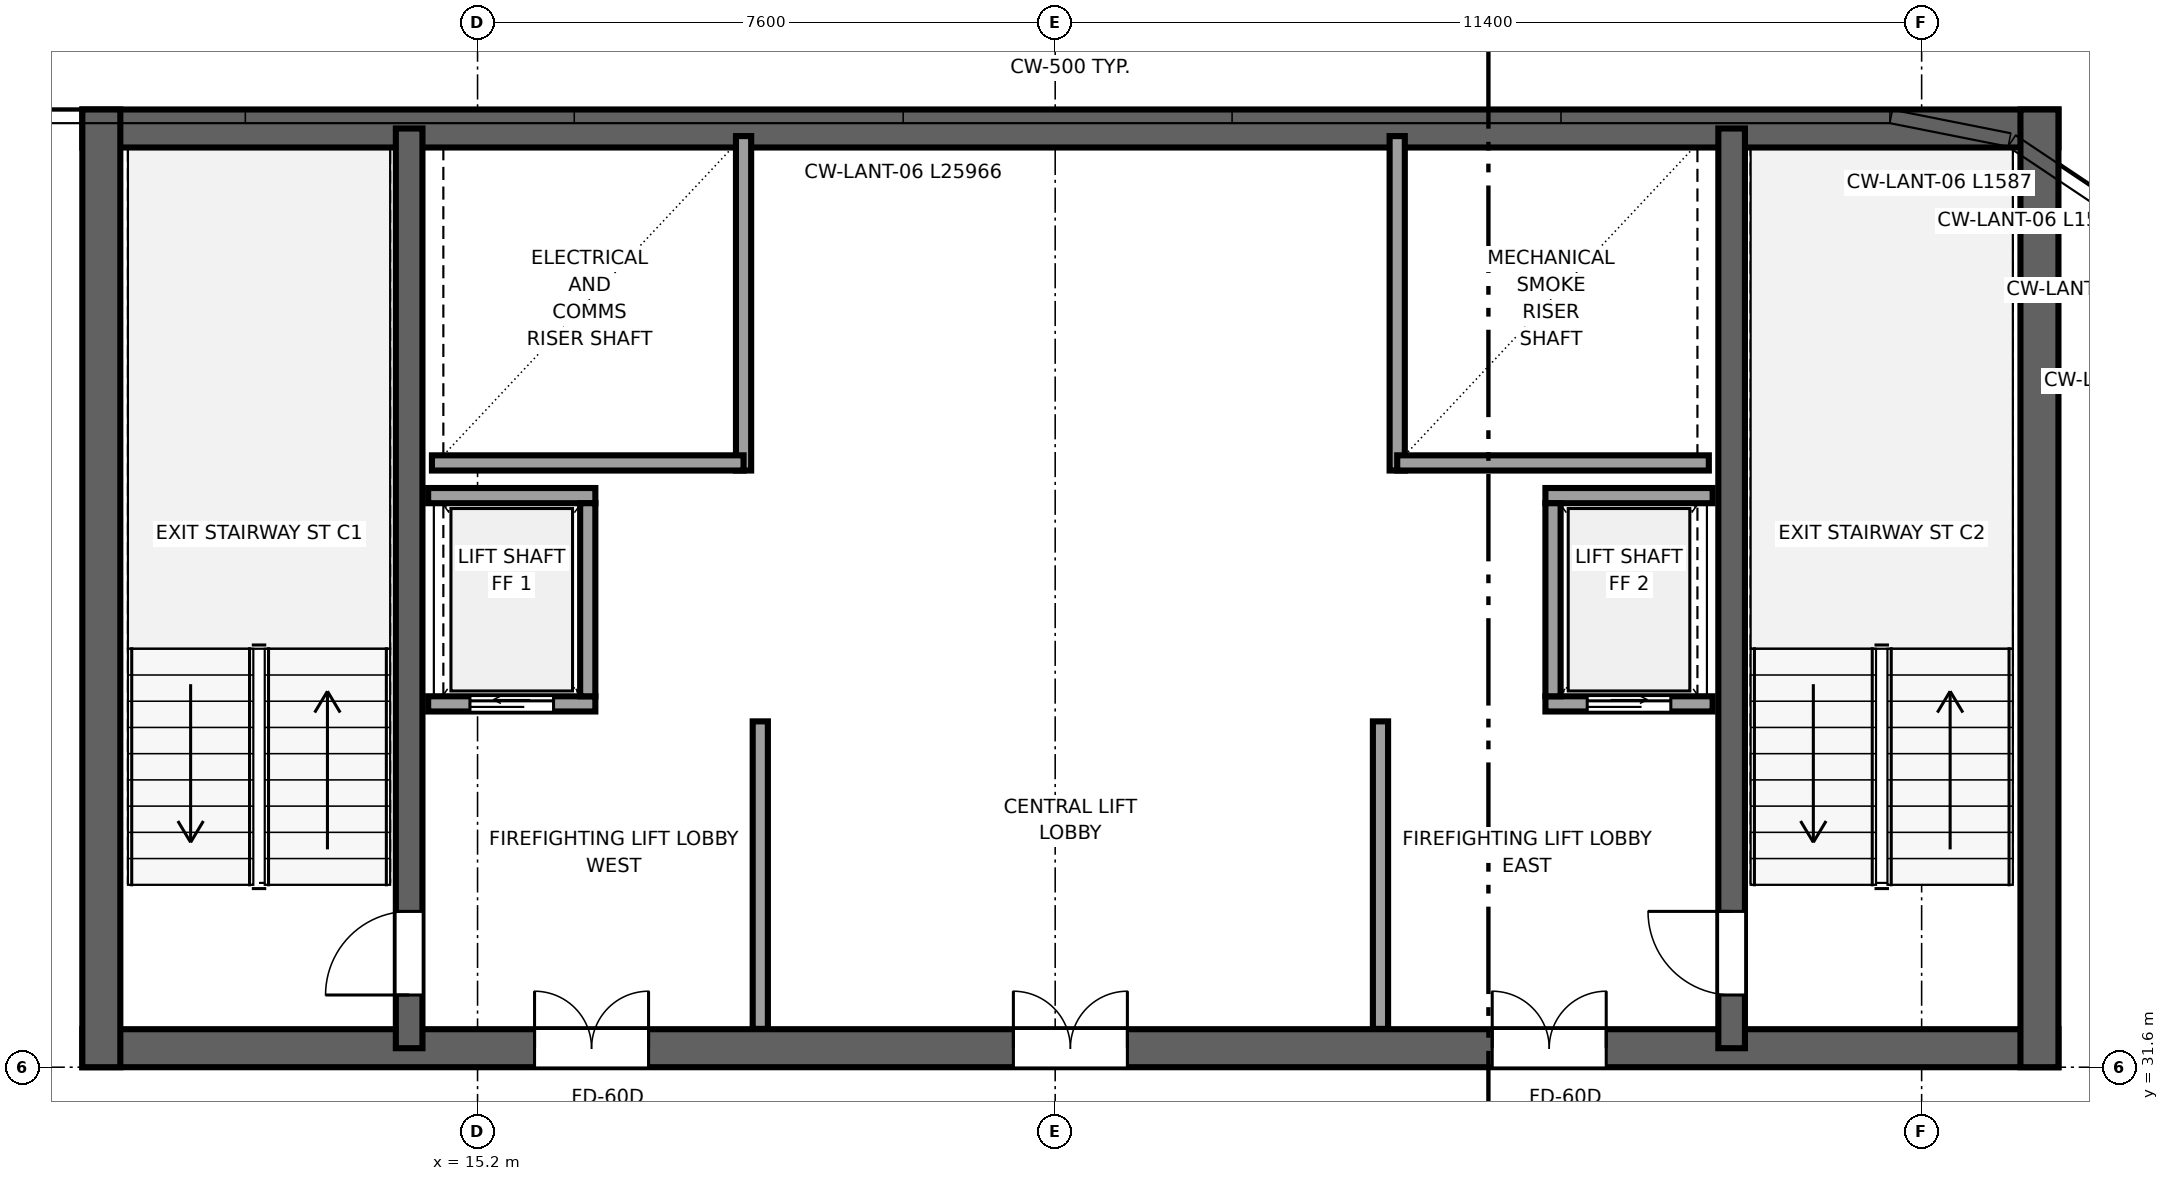
"""IFC4 building model, lengths in metres.
Left out: names, types, materials, properties, quantities, classifications, styles, units other than length and angle.
Written with IfcOpenShell. Run it as: python <this file> out.ifc"""

import sys

from ifc_helpers import new_model, si_unit, direction, frame, frame_2d, origin, place, context, subcontext, project, spatial, rectangle, extrude, source, transform, mapped, element, fill, save


model = new_model("IFC4")
c1 = context("Model", 3, precision=1e-05, world=origin(), true_north=direction((0.0, 1.0)))
c2 = subcontext(c1, "Body", "Model", "MODEL_VIEW")
j1 = project(units=[si_unit("LENGTHUNIT", "METRE"), si_unit("PLANEANGLEUNIT", "RADIAN")], contexts=[c1])
p1 = place(None, origin())
s1 = spatial("IfcSite", under=j1, at=p1, CompositionType="ELEMENT")
p2 = place(p1, origin())
s2 = spatial("IfcBuilding", under=s1, at=p2, CompositionType="ELEMENT")
p3 = place(p2, frame((0.0, 0.0, 294.75)))
s3 = spatial("IfcBuildingStorey", under=s2, at=p3, CompositionType="ELEMENT", Elevation=294.75)
p4 = place(p3, frame((10.0, 31.85, 0.0), z_axis=(0.0, 0.0, 1.0), x_axis=(1.0, 0.0, 0.0)))
e1 = element("IfcWall", 1, at=p4, inside=s3, PredefinedType="SHEAR", context=c2, shape_type="SweptSolid", body=[
    extrude(rectangle(XDim=26.0, YDim=0.5, at=frame_2d((13.0, 0.0))), origin(), (0.0, 0.0, 1.0), 3.8),
])
p5 = place(p4, frame((7.45, 0.0, 0.0), z_axis=(0.0, 0.0, 1.0), x_axis=(-1.0, 0.0, 0.0)))
e2 = element("IfcOpeningElement", 2, at=p5, cuts=e1, PredefinedType="OPENING", context=c2, shape_type="SweptSolid", body=[
    extrude(rectangle(XDim=1.5, YDim=2.04, at=frame_2d((0.75, 1.02))), frame((0.0, 0.26, 0.0), z_axis=(0.0, -1.0, 0.0), x_axis=(1.0, 0.0, 0.0)), (0.0, 0.0, 1.0), 0.52),
])
p6 = place(p4, frame((13.75, 0.0, 0.0), z_axis=(0.0, 0.0, 1.0), x_axis=(-1.0, 0.0, 0.0)))
e3 = element("IfcOpeningElement", 3, at=p6, cuts=e1, PredefinedType="OPENING", context=c2, shape_type="SweptSolid", body=[
    extrude(rectangle(XDim=1.5, YDim=2.04, at=frame_2d((0.75, 1.02))), frame((0.0, 0.26, 0.0), z_axis=(0.0, -1.0, 0.0), x_axis=(1.0, 0.0, 0.0)), (0.0, 0.0, 1.0), 0.52),
])
p7 = place(p4, frame((20.05, 0.0, 0.0), z_axis=(0.0, 0.0, 1.0), x_axis=(-1.0, 0.0, 0.0)))
e4 = element("IfcOpeningElement", 4, at=p7, cuts=e1, PredefinedType="OPENING", context=c2, shape_type="SweptSolid", body=[
    extrude(rectangle(XDim=1.5, YDim=2.04, at=frame_2d((0.75, 1.02))), frame((0.0, 0.26, 0.0), z_axis=(0.0, -1.0, 0.0), x_axis=(1.0, 0.0, 0.0)), (0.0, 0.0, 1.0), 0.52),
])
p8 = place(p3, frame((10.0, 43.95, 0.0), z_axis=(0.0, 0.0, 1.0), x_axis=(1.0, 0.0, 0.0)))
e5 = element("IfcWall", 5, at=p8, inside=s3, PredefinedType="SHEAR", context=c2, shape_type="SweptSolid", body=[
    extrude(rectangle(XDim=26.0, YDim=0.5, at=frame_2d((13.0, 0.0))), origin(), (0.0, 0.0, 1.0), 3.8),
])
for number, where, z_axis, x_axis in (
    (6, (10.25, 31.6, 0.0), (0.0, 0.0, 1.0), (0.0, 1.0, 0.0)),
    (7, (35.75, 31.6, 0.0), (0.0, 0.0, 1.0), (0.0, 1.0, 0.0)),
):
    element("IfcWall", number, at=place(p3, frame(where, z_axis=z_axis, x_axis=x_axis)), inside=s3, PredefinedType="SHEAR", context=c2, shape_type="SweptSolid", body=[
        extrude(rectangle(XDim=12.6, YDim=0.5, at=frame_2d((6.3, 0.0))), origin(), (0.0, 0.0, 1.0), 3.8),
    ])
p9 = place(p3, frame((14.3, 31.85, 0.0), z_axis=(0.0, 0.0, 1.0), x_axis=(0.0, 1.0, 0.0)))
e8 = element("IfcWall", 8, at=p9, inside=s3, PredefinedType="SHEAR", context=c2, shape_type="SweptSolid", body=[
    extrude(rectangle(XDim=12.1, YDim=0.35, at=frame_2d((6.05, 0.0))), origin(), (0.0, 0.0, 1.0), 3.8),
])
p10 = place(p9, frame((0.7, 0.0, 0.0)))
e9 = element("IfcOpeningElement", 9, at=p10, cuts=e8, PredefinedType="OPENING", context=c2, shape_type="SweptSolid", body=[
    extrude(rectangle(XDim=1.1, YDim=2.12, at=frame_2d((0.55, 1.06))), frame((0.0, 0.185, 0.0), z_axis=(0.0, -1.0, 0.0), x_axis=(1.0, 0.0, 0.0)), (0.0, 0.0, 1.0), 0.37),
])
p11 = place(p3, frame((31.7, 31.85, 0.0), z_axis=(0.0, 0.0, 1.0), x_axis=(0.0, 1.0, 0.0)))
e10 = element("IfcWall", 10, at=p11, inside=s3, PredefinedType="SHEAR", context=c2, shape_type="SweptSolid", body=[
    extrude(rectangle(XDim=12.1, YDim=0.35, at=frame_2d((6.05, 0.0))), origin(), (0.0, 0.0, 1.0), 3.8),
])
p12 = place(p11, frame((1.8, 0.0, 0.0), z_axis=(0.0, 0.0, 1.0), x_axis=(-1.0, 0.0, 0.0)))
e11 = element("IfcOpeningElement", 11, at=p12, cuts=e10, PredefinedType="OPENING", context=c2, shape_type="SweptSolid", body=[
    extrude(rectangle(XDim=1.1, YDim=2.12, at=frame_2d((0.55, 1.06))), frame((0.0, 0.185, 0.0), z_axis=(0.0, -1.0, 0.0), x_axis=(1.0, 0.0, 0.0)), (0.0, 0.0, 1.0), 0.37),
])
p13 = place(p3, frame((18.7, 39.45, 0.0), z_axis=(0.0, 0.0, 1.0), x_axis=(0.0, 1.0, 0.0)))
e12 = element("IfcWall", 12, at=p13, inside=s3, PredefinedType="SOLIDWALL", context=c2, shape_type="SweptSolid", body=[
    extrude(rectangle(XDim=4.4, YDim=0.2, at=frame_2d((2.2, 0.0))), origin(), (0.0, 0.0, 1.0), 3.58),
])
p14 = place(p3, frame((14.6, 39.55, 0.0), z_axis=(0.0, 0.0, 1.0), x_axis=(1.0, 0.0, 0.0)))
e13 = element("IfcWall", 13, at=p14, inside=s3, PredefinedType="SOLIDWALL", context=c2, shape_type="SweptSolid", body=[
    extrude(rectangle(XDim=4.1, YDim=0.2, at=frame_2d((2.05, 0.0))), origin(), (0.0, 0.0, 1.0), 3.58),
])
p15 = place(p3, frame((27.3, 39.45, 0.0), z_axis=(0.0, 0.0, 1.0), x_axis=(0.0, 1.0, 0.0)))
e14 = element("IfcWall", 14, at=p15, inside=s3, PredefinedType="SOLIDWALL", context=c2, shape_type="SweptSolid", body=[
    extrude(rectangle(XDim=4.4, YDim=0.2, at=frame_2d((2.2, 0.0))), origin(), (0.0, 0.0, 1.0), 3.58),
])
p16 = place(p3, frame((27.3, 39.55, 0.0), z_axis=(0.0, 0.0, 1.0), x_axis=(1.0, 0.0, 0.0)))
e15 = element("IfcWall", 15, at=p16, inside=s3, PredefinedType="SOLIDWALL", context=c2, shape_type="SweptSolid", body=[
    extrude(rectangle(XDim=4.1, YDim=0.2, at=frame_2d((2.05, 0.0))), origin(), (0.0, 0.0, 1.0), 3.58),
])
for number, where, z_axis, x_axis in (
    (16, (18.92, 32.104, 0.0), (0.0, 0.0, 1.0), (0.0, 1.0, 0.0)),
    (17, (27.08, 32.104, 0.0), (0.0, 0.0, 1.0), (0.0, 1.0, 0.0)),
):
    element("IfcWall", number, at=place(p3, frame(where, z_axis=z_axis, x_axis=x_axis)), inside=s3, PredefinedType="SOLIDWALL", context=c2, shape_type="SweptSolid", body=[
        extrude(rectangle(XDim=4.046, YDim=0.2, at=frame_2d((2.023, 0.0))), origin(), (0.0, 0.0, 1.0), 3.58),
    ])
p17 = place(p3, frame((29.25, 36.38, 0.0), z_axis=(0.0, 0.0, 1.0), x_axis=(1.0, 0.0, 0.0)))
e18 = element("IfcWall", 18, at=p17, inside=s3, PredefinedType="SOLIDWALL", context=c2, shape_type="SweptSolid", body=[
    extrude(rectangle(XDim=2.2, YDim=0.2, at=frame_2d((1.1, 0.0))), origin(), (0.0, 0.0, 1.0), 3.58),
])
p18 = place(p17, frame((0.55, 0.0, 0.0)))
e19 = element("IfcOpeningElement", 19, at=p18, cuts=e18, PredefinedType="OPENING", context=c2, shape_type="SweptSolid", body=[
    extrude(rectangle(XDim=1.1, YDim=2.12, at=frame_2d((0.55, 1.06))), frame((0.0, 0.11, 0.0), z_axis=(0.0, -1.0, 0.0), x_axis=(1.0, 0.0, 0.0)), (0.0, 0.0, 1.0), 0.22),
])
p19 = place(p3, frame((29.25, 39.12, 0.0), z_axis=(0.0, 0.0, 1.0), x_axis=(1.0, 0.0, 0.0)))
e20 = element("IfcWall", 20, at=p19, inside=s3, PredefinedType="SOLIDWALL", context=c2, shape_type="SweptSolid", body=[
    extrude(rectangle(XDim=2.2, YDim=0.2, at=frame_2d((1.1, 0.0))), origin(), (0.0, 0.0, 1.0), 3.58),
])
p20 = place(p3, frame((29.35, 36.48, 0.0), z_axis=(0.0, 0.0, 1.0), x_axis=(0.0, 1.0, 0.0)))
e21 = element("IfcWall", 21, at=p20, inside=s3, PredefinedType="SOLIDWALL", context=c2, shape_type="SweptSolid", body=[
    extrude(rectangle(XDim=2.54, YDim=0.2, at=frame_2d((1.27, 0.0))), origin(), (0.0, 0.0, 1.0), 3.58),
])
p21 = place(p3, frame((14.55, 36.38, 0.0), z_axis=(0.0, 0.0, 1.0), x_axis=(1.0, 0.0, 0.0)))
e22 = element("IfcWall", 22, at=p21, inside=s3, PredefinedType="SOLIDWALL", context=c2, shape_type="SweptSolid", body=[
    extrude(rectangle(XDim=2.2, YDim=0.2, at=frame_2d((1.1, 0.0))), origin(), (0.0, 0.0, 1.0), 3.58),
])
p22 = place(p21, frame((0.55, 0.0, 0.0)))
e23 = element("IfcOpeningElement", 23, at=p22, cuts=e22, PredefinedType="OPENING", context=c2, shape_type="SweptSolid", body=[
    extrude(rectangle(XDim=1.1, YDim=2.12, at=frame_2d((0.55, 1.06))), frame((0.0, 0.11, 0.0), z_axis=(0.0, -1.0, 0.0), x_axis=(1.0, 0.0, 0.0)), (0.0, 0.0, 1.0), 0.22),
])
p23 = place(p3, frame((14.55, 39.12, 0.0), z_axis=(0.0, 0.0, 1.0), x_axis=(1.0, 0.0, 0.0)))
e24 = element("IfcWall", 24, at=p23, inside=s3, PredefinedType="SOLIDWALL", context=c2, shape_type="SweptSolid", body=[
    extrude(rectangle(XDim=2.2, YDim=0.2, at=frame_2d((1.1, 0.0))), origin(), (0.0, 0.0, 1.0), 3.58),
])
p24 = place(p3, frame((16.65, 36.48, 0.0), z_axis=(0.0, 0.0, 1.0), x_axis=(0.0, 1.0, 0.0)))
e25 = element("IfcWall", 25, at=p24, inside=s3, PredefinedType="SOLIDWALL", context=c2, shape_type="SweptSolid", body=[
    extrude(rectangle(XDim=2.54, YDim=0.2, at=frame_2d((1.27, 0.0))), origin(), (0.0, 0.0, 1.0), 3.58),
])
m1 = source(origin(), c2, "Body", "SweptSolid", [
    extrude(rectangle(XDim=1.1, YDim=2.12, at=frame_2d((0.55, 1.06))), frame((0.0, 0.025, 0.0), z_axis=(0.0, -1.0, 0.0), x_axis=(1.0, 0.0, 0.0)), (0.0, 0.0, 1.0), 0.05),
])
p25 = place(p10, origin())
e26 = element("IfcDoor", 26, at=p25, inside=s3, OperationType="SINGLE_SWING_LEFT", PredefinedType="DOOR", context=c2, shape_type="MappedRepresentation", body=[
    mapped(m1, transform((0.0, 0.0, 0.0), x_axis=(1.0, 0.0, 0.0), y_axis=(0.0, 1.0, 0.0), z_axis=(0.0, 0.0, 1.0), scale=1.0)),
])
fill(e9, e26)
p26 = place(p12, origin())
e27 = element("IfcDoor", 27, at=p26, inside=s3, OperationType="SINGLE_SWING_RIGHT", PredefinedType="DOOR", context=c2, shape_type="MappedRepresentation", body=[
    mapped(m1, transform((0.0, 0.0, 0.0), x_axis=(1.0, 0.0, 0.0), y_axis=(0.0, 1.0, 0.0), z_axis=(0.0, 0.0, 1.0), scale=1.0)),
])
fill(e11, e27)
m2 = source(origin(), c2, "Body", "SweptSolid", [
    extrude(rectangle(XDim=1.5, YDim=2.04, at=frame_2d((0.75, 1.02))), frame((0.0, 0.025, 0.0), z_axis=(0.0, -1.0, 0.0), x_axis=(1.0, 0.0, 0.0)), (0.0, 0.0, 1.0), 0.05),
])
p27 = place(p5, origin())
e28 = element("IfcDoor", 28, at=p27, inside=s3, OperationType="DOUBLE_DOOR_SINGLE_SWING", PredefinedType="DOOR", context=c2, shape_type="MappedRepresentation", body=[
    mapped(m2, transform((0.0, 0.0, 0.0), x_axis=(1.0, 0.0, 0.0), y_axis=(0.0, 1.0, 0.0), z_axis=(0.0, 0.0, 1.0), scale=1.0)),
])
fill(e2, e28)
p28 = place(p6, origin())
e29 = element("IfcDoor", 29, at=p28, inside=s3, OperationType="DOUBLE_DOOR_SINGLE_SWING", PredefinedType="DOOR", context=c2, shape_type="MappedRepresentation", body=[
    mapped(m2, transform((0.0, 0.0, 0.0), x_axis=(1.0, 0.0, 0.0), y_axis=(0.0, 1.0, 0.0), z_axis=(0.0, 0.0, 1.0), scale=1.0)),
])
fill(e3, e29)
p29 = place(p7, origin())
e30 = element("IfcDoor", 30, at=p29, inside=s3, OperationType="DOUBLE_DOOR_SINGLE_SWING", PredefinedType="DOOR", context=c2, shape_type="MappedRepresentation", body=[
    mapped(m2, transform((0.0, 0.0, 0.0), x_axis=(1.0, 0.0, 0.0), y_axis=(0.0, 1.0, 0.0), z_axis=(0.0, 0.0, 1.0), scale=1.0)),
])
fill(e4, e30)
m3 = source(origin(), c2, "Body", "SweptSolid", [
    extrude(rectangle(XDim=1.1, YDim=2.12, at=frame_2d((0.55, 1.06))), frame((0.0, 0.025, 0.0), z_axis=(0.0, -1.0, 0.0), x_axis=(1.0, 0.0, 0.0)), (0.0, 0.0, 1.0), 0.05),
])
p30 = place(p18, origin())
e31 = element("IfcDoor", 31, at=p30, inside=s3, OperationType="SLIDING_TO_RIGHT", PredefinedType="DOOR", context=c2, shape_type="MappedRepresentation", body=[
    mapped(m3, transform((0.0, 0.0, 0.0), x_axis=(1.0, 0.0, 0.0), y_axis=(0.0, 1.0, 0.0), z_axis=(0.0, 0.0, 1.0), scale=1.0)),
])
fill(e19, e31)
p31 = place(p22, origin())
e32 = element("IfcDoor", 32, at=p31, inside=s3, OperationType="SLIDING_TO_LEFT", PredefinedType="DOOR", context=c2, shape_type="MappedRepresentation", body=[
    mapped(m3, transform((0.0, 0.0, 0.0), x_axis=(1.0, 0.0, 0.0), y_axis=(0.0, 1.0, 0.0), z_axis=(0.0, 0.0, 1.0), scale=1.0)),
])
fill(e23, e32)
save(model, sys.argv[1])
